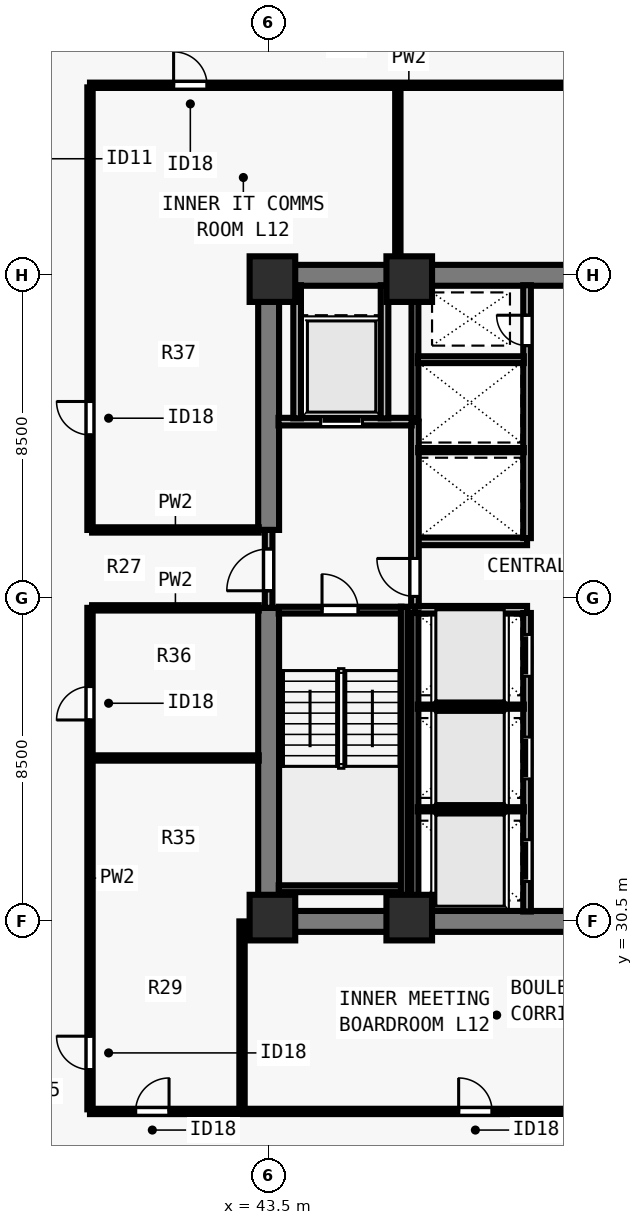
"""IFC4 building model, lengths in metres.
Left out: names, types, materials, properties, quantities, classifications, styles, units other than length and angle.
Written with IfcOpenShell. Run it as: python <this file> out.ifc"""

import sys

from ifc_helpers import new_model, si_unit, direction, frame, frame_2d, origin, origin_2d, place, context, subcontext, project, spatial, rectangle, extrude, element, fill, save


model = new_model("IFC4")
c1 = context("Model", 3, precision=1e-05, world=origin(), true_north=direction((0.0, 1.0)))
c2 = subcontext(c1, "Body", "Model", "MODEL_VIEW")
j1 = project(units=[si_unit("LENGTHUNIT", "METRE"), si_unit("PLANEANGLEUNIT", "RADIAN")], contexts=[c1])
p1 = place(None, origin())
s1 = spatial("IfcSite", under=j1, at=p1, CompositionType="ELEMENT")
p2 = place(p1, origin())
s2 = spatial("IfcBuilding", under=s1, at=p2, CompositionType="ELEMENT")
p3 = place(p2, frame((0.0, 0.0, 48.0)))
s3 = spatial("IfcBuildingStorey", under=s2, at=p3, CompositionType="ELEMENT", Elevation=48.0)
for number, where, z_axis, x_axis in (
    (1, (43.6, 30.6, 0.0), (0.0, 0.0, 1.0), (1.0, 0.0, 0.0)),
    (2, (47.2, 30.6, 0.0), (0.0, 0.0, 1.0), (1.0, 0.0, 0.0)),
    (3, (43.6, 47.4, 0.0), (0.0, 0.0, 1.0), (1.0, 0.0, 0.0)),
    (4, (47.2, 47.4, 0.0), (0.0, 0.0, 1.0), (1.0, 0.0, 0.0)),
):
    element("IfcColumn", number, at=place(p3, frame(where, z_axis=z_axis, x_axis=x_axis)), inside=s3, PredefinedType="COLUMN", context=c2, shape_type="SweptSolid", body=[
        extrude(rectangle(XDim=1.2, YDim=1.2, at=origin_2d()), origin(), (0.0, 0.0, 1.0), 3.5),
    ])
for number, where, z_axis, x_axis in (
    (5, (43.225, 30.5, 0.0), (0.0, 0.0, 1.0), (1.0, 0.0, 0.0)),
    (6, (43.225, 47.5, 0.0), (0.0, 0.0, 1.0), (1.0, 0.0, 0.0)),
):
    element("IfcWall", number, at=place(p3, frame(where, z_axis=z_axis, x_axis=x_axis)), inside=s3, PredefinedType="SHEAR", context=c2, shape_type="SweptSolid", body=[
        extrude(rectangle(XDim=17.55, YDim=0.55, at=frame_2d((8.775, 0.0))), origin(), (0.0, 0.0, 1.0), 3.28),
    ])
p4 = place(p3, frame((43.5, 30.765, 0.0), z_axis=(0.0, 0.0, 1.0), x_axis=(0.0, 1.0, 0.0)))
e7 = element("IfcWall", 7, at=p4, inside=s3, PredefinedType="SHEAR", context=c2, shape_type="SweptSolid", body=[
    extrude(rectangle(XDim=7.985, YDim=0.55, at=frame_2d((3.993, 0.0))), origin(), (0.0, 0.0, 1.0), 3.28),
])
p5 = place(p3, frame((43.5, 40.8, 0.0), z_axis=(0.0, 0.0, 1.0), x_axis=(0.0, 1.0, 0.0)))
e8 = element("IfcWall", 8, at=p5, inside=s3, PredefinedType="SHEAR", context=c2, shape_type="SweptSolid", body=[
    extrude(rectangle(XDim=6.435, YDim=0.55, at=frame_2d((3.218, 0.0))), origin(), (0.0, 0.0, 1.0), 3.28),
])
for number, where, z_axis, x_axis in (
    (9, (47.35, 38.7, 0.0), (0.0, 0.0, 1.0), (1.0, 0.0, 0.0)),
    (10, (47.35, 40.5, 0.0), (0.0, 0.0, 1.0), (1.0, 0.0, 0.0)),
):
    element("IfcWall", number, at=place(p3, frame(where, z_axis=z_axis, x_axis=x_axis)), inside=s3, PredefinedType="SOLIDWALL", context=c2, shape_type="SweptSolid", body=[
        extrude(rectangle(XDim=2.95, YDim=0.2, at=frame_2d((1.475, 0.0))), origin(), (0.0, 0.0, 1.0), 3.28),
    ])
p6 = place(p3, frame((50.3, 30.76, 0.0), z_axis=(0.0, 0.0, 1.0), x_axis=(0.0, 1.0, 0.0)))
e11 = element("IfcWall", 11, at=p6, inside=s3, PredefinedType="SOLIDWALL", context=c2, shape_type="SweptSolid", body=[
    extrude(rectangle(XDim=7.855, YDim=0.2, at=frame_2d((3.927, 0.0))), origin(), (0.0, 0.0, 1.0), 3.28),
])
p7 = place(p6, frame((0.79, 0.0, 0.0)))
e12 = element("IfcOpeningElement", 12, at=p7, cuts=e11, PredefinedType="OPENING", context=c2, shape_type="SweptSolid", body=[
    extrude(rectangle(XDim=1.1, YDim=2.2, at=frame_2d((0.55, 1.1))), frame((0.0, 0.11, 0.0), z_axis=(0.0, -1.0, 0.0), x_axis=(1.0, 0.0, 0.0)), (0.0, 0.0, 1.0), 0.22),
])
p8 = place(p6, frame((3.49, 0.0, 0.0)))
e13 = element("IfcOpeningElement", 13, at=p8, cuts=e11, PredefinedType="OPENING", context=c2, shape_type="SweptSolid", body=[
    extrude(rectangle(XDim=1.1, YDim=2.2, at=frame_2d((0.55, 1.1))), frame((0.0, 0.11, 0.0), z_axis=(0.0, -1.0, 0.0), x_axis=(1.0, 0.0, 0.0)), (0.0, 0.0, 1.0), 0.22),
])
p9 = place(p6, frame((6.19, 0.0, 0.0)))
e14 = element("IfcOpeningElement", 14, at=p9, cuts=e11, PredefinedType="OPENING", context=c2, shape_type="SweptSolid", body=[
    extrude(rectangle(XDim=1.1, YDim=2.2, at=frame_2d((0.55, 1.1))), frame((0.0, 0.11, 0.0), z_axis=(0.0, -1.0, 0.0), x_axis=(1.0, 0.0, 0.0)), (0.0, 0.0, 1.0), 0.22),
])
p10 = place(p3, frame((50.3, 40.585, 0.0), z_axis=(0.0, 0.0, 1.0), x_axis=(0.0, 1.0, 0.0)))
e15 = element("IfcWall", 15, at=p10, inside=s3, PredefinedType="SOLIDWALL", context=c2, shape_type="SweptSolid", body=[
    extrude(rectangle(XDim=6.655, YDim=0.2, at=frame_2d((3.328, 0.0))), origin(), (0.0, 0.0, 1.0), 3.28),
])
p11 = place(p10, frame((5.065, 0.0, 0.0)))
e16 = element("IfcOpeningElement", 16, at=p11, cuts=e15, PredefinedType="OPENING", context=c2, shape_type="SweptSolid", body=[
    extrude(rectangle(XDim=0.8, YDim=2.08, at=frame_2d((0.4, 1.04))), frame((0.0, 0.11, 0.0), z_axis=(0.0, -1.0, 0.0), x_axis=(1.0, 0.0, 0.0)), (0.0, 0.0, 1.0), 0.22),
])
p12 = place(p3, frame((43.5, 38.75, 0.0), z_axis=(0.0, 0.0, 1.0), x_axis=(0.0, 1.0, 0.0)))
e17 = element("IfcWall", 17, at=p12, inside=s3, PredefinedType="SOLIDWALL", context=c2, shape_type="SweptSolid", body=[
    extrude(rectangle(XDim=2.05, YDim=0.2, at=frame_2d((1.025, 0.0))), origin(), (0.0, 0.0, 1.0), 3.28),
])
p13 = place(p12, frame((0.45, 0.0, 0.0)))
e18 = element("IfcOpeningElement", 18, at=p13, cuts=e17, PredefinedType="OPENING", context=c2, shape_type="SweptSolid", body=[
    extrude(rectangle(XDim=1.1, YDim=2.15, at=frame_2d((0.55, 1.075))), frame((0.0, 0.11, 0.0), z_axis=(0.0, -1.0, 0.0), x_axis=(1.0, 0.0, 0.0)), (0.0, 0.0, 1.0), 0.22),
])
p14 = place(p3, frame((47.35, 38.785, 0.0), z_axis=(0.0, 0.0, 1.0), x_axis=(0.0, 1.0, 0.0)))
e19 = element("IfcWall", 19, at=p14, inside=s3, PredefinedType="SOLIDWALL", context=c2, shape_type="SweptSolid", body=[
    extrude(rectangle(XDim=4.865, YDim=0.2, at=frame_2d((2.433, 0.0))), origin(), (0.0, 0.0, 1.0), 3.28),
])
p15 = place(p14, frame((0.265, 0.0, 0.0)))
e20 = element("IfcOpeningElement", 20, at=p15, cuts=e19, PredefinedType="OPENING", context=c2, shape_type="SweptSolid", body=[
    extrude(rectangle(XDim=1.0, YDim=2.15, at=frame_2d((0.5, 1.075))), frame((0.0, 0.11, 0.0), z_axis=(0.0, -1.0, 0.0), x_axis=(1.0, 0.0, 0.0)), (0.0, 0.0, 1.0), 0.22),
])
p16 = place(p3, frame((43.76, 43.65, 0.0), z_axis=(0.0, 0.0, 1.0), x_axis=(1.0, 0.0, 0.0)))
e21 = element("IfcWall", 21, at=p16, inside=s3, PredefinedType="SOLIDWALL", context=c2, shape_type="SweptSolid", body=[
    extrude(rectangle(XDim=3.505, YDim=0.2, at=frame_2d((1.752, 0.0))), origin(), (0.0, 0.0, 1.0), 3.28),
])
p17 = place(p16, frame((1.11, 0.0, 0.0)))
e22 = element("IfcOpeningElement", 22, at=p17, cuts=e21, PredefinedType="OPENING", context=c2, shape_type="SweptSolid", body=[
    extrude(rectangle(XDim=1.1, YDim=2.2, at=frame_2d((0.55, 1.1))), frame((0.0, 0.11, 0.0), z_axis=(0.0, -1.0, 0.0), x_axis=(1.0, 0.0, 0.0)), (0.0, 0.0, 1.0), 0.22),
])
for number, where, z_axis, x_axis in (
    (23, (46.55, 43.735, 0.0), (0.0, 0.0, 1.0), (0.0, 1.0, 0.0)),
    (24, (44.25, 43.735, 0.0), (0.0, 0.0, 1.0), (0.0, 1.0, 0.0)),
):
    element("IfcWall", number, at=place(p3, frame(where, z_axis=z_axis, x_axis=x_axis)), inside=s3, PredefinedType="SOLIDWALL", context=c2, shape_type="SweptSolid", body=[
        extrude(rectangle(XDim=3.505, YDim=0.2, at=frame_2d((1.752, 0.0))), origin(), (0.0, 0.0, 1.0), 3.28),
    ])
p18 = place(p3, frame((47.35, 30.76, 0.0), z_axis=(0.0, 0.0, 1.0), x_axis=(0.0, 1.0, 0.0)))
e25 = element("IfcWall", 25, at=p18, inside=s3, PredefinedType="SOLIDWALL", context=c2, shape_type="SweptSolid", body=[
    extrude(rectangle(XDim=7.855, YDim=0.18, at=frame_2d((3.927, 0.0))), origin(), (0.0, 0.0, 1.0), 3.28),
])
for number, where, z_axis, x_axis in (
    (26, (47.425, 33.45, 0.0), (0.0, 0.0, 1.0), (1.0, 0.0, 0.0)),
    (27, (47.425, 36.15, 0.0), (0.0, 0.0, 1.0), (1.0, 0.0, 0.0)),
):
    element("IfcWall", number, at=place(p3, frame(where, z_axis=z_axis, x_axis=x_axis)), inside=s3, PredefinedType="PARTITIONING", context=c2, shape_type="SweptSolid", body=[
        extrude(rectangle(XDim=2.79, YDim=0.11, at=frame_2d((1.395, 0.0))), origin(), (0.0, 0.0, 1.0), 3.28),
    ])
p19 = place(p3, frame((47.35, 43.735, 0.0), z_axis=(0.0, 0.0, 1.0), x_axis=(0.0, 1.0, 0.0)))
e28 = element("IfcWall", 28, at=p19, inside=s3, PredefinedType="SOLIDWALL", context=c2, shape_type="SweptSolid", body=[
    extrude(rectangle(XDim=3.505, YDim=0.18, at=frame_2d((1.752, 0.0))), origin(), (0.0, 0.0, 1.0), 3.28),
])
p20 = place(p3, frame((47.435, 42.9, 0.0), z_axis=(0.0, 0.0, 1.0), x_axis=(1.0, 0.0, 0.0)))
e29 = element("IfcWall", 29, at=p20, inside=s3, PredefinedType="PARTITIONING", context=c2, shape_type="SweptSolid", body=[
    extrude(rectangle(XDim=2.78, YDim=0.11, at=frame_2d((1.39, 0.0))), origin(), (0.0, 0.0, 1.0), 3.28),
])
p21 = place(p3, frame((47.425, 45.28, 0.0), z_axis=(0.0, 0.0, 1.0), x_axis=(1.0, 0.0, 0.0)))
e30 = element("IfcWall", 30, at=p21, inside=s3, PredefinedType="SOLIDWALL", context=c2, shape_type="SweptSolid", body=[
    extrude(rectangle(XDim=2.79, YDim=0.18, at=frame_2d((1.395, 0.0))), origin(), (0.0, 0.0, 1.0), 3.28),
])
p22 = place(p3, frame((38.8, 25.5, 0.0), z_axis=(0.0, 0.0, 1.0), x_axis=(1.0, 0.0, 0.0)))
e31 = element("IfcWall", 31, at=p22, inside=s3, PredefinedType="PARTITIONING", context=c2, shape_type="SweptSolid", body=[
    extrude(rectangle(XDim=26.4, YDim=0.14, at=frame_2d((13.2, 0.0))), origin(), (0.0, 0.0, 1.0), 3.28),
])
p23 = place(p22, frame((1.2, 0.0, 0.0)))
e32 = element("IfcOpeningElement", 32, at=p23, cuts=e31, PredefinedType="OPENING", context=c2, shape_type="SweptSolid", body=[
    extrude(rectangle(XDim=0.88, YDim=2.1, at=frame_2d((0.44, 1.05))), frame((0.0, 0.08, 0.0), z_axis=(0.0, -1.0, 0.0), x_axis=(1.0, 0.0, 0.0)), (0.0, 0.0, 1.0), 0.16),
])
p24 = place(p22, frame((9.7, 0.0, 0.0)))
e33 = element("IfcOpeningElement", 33, at=p24, cuts=e31, PredefinedType="OPENING", context=c2, shape_type="SweptSolid", body=[
    extrude(rectangle(XDim=0.88, YDim=2.1, at=frame_2d((0.44, 1.05))), frame((0.0, 0.08, 0.0), z_axis=(0.0, -1.0, 0.0), x_axis=(1.0, 0.0, 0.0)), (0.0, 0.0, 1.0), 0.16),
])
p25 = place(p22, frame((20.2, 0.0, 0.0)))
e34 = element("IfcOpeningElement", 34, at=p25, cuts=e31, PredefinedType="OPENING", context=c2, shape_type="SweptSolid", body=[
    extrude(rectangle(XDim=0.88, YDim=2.1, at=frame_2d((0.44, 1.05))), frame((0.0, 0.08, 0.0), z_axis=(0.0, -1.0, 0.0), x_axis=(1.0, 0.0, 0.0)), (0.0, 0.0, 1.0), 0.16),
])
p26 = place(p3, frame((38.8, 52.5, 0.0), z_axis=(0.0, 0.0, 1.0), x_axis=(1.0, 0.0, 0.0)))
e35 = element("IfcWall", 35, at=p26, inside=s3, PredefinedType="PARTITIONING", context=c2, shape_type="SweptSolid", body=[
    extrude(rectangle(XDim=26.4, YDim=0.14, at=frame_2d((13.2, 0.0))), origin(), (0.0, 0.0, 1.0), 3.28),
])
p27 = place(p26, frame((2.2, 0.0, 0.0)))
e36 = element("IfcOpeningElement", 36, at=p27, cuts=e35, PredefinedType="OPENING", context=c2, shape_type="SweptSolid", body=[
    extrude(rectangle(XDim=0.88, YDim=2.1, at=frame_2d((0.44, 1.05))), frame((0.0, 0.08, 0.0), z_axis=(0.0, -1.0, 0.0), x_axis=(1.0, 0.0, 0.0)), (0.0, 0.0, 1.0), 0.16),
])
p28 = place(p26, frame((13.7, 0.0, 0.0)))
e37 = element("IfcOpeningElement", 37, at=p28, cuts=e35, PredefinedType="OPENING", context=c2, shape_type="SweptSolid", body=[
    extrude(rectangle(XDim=0.88, YDim=2.1, at=frame_2d((0.44, 1.05))), frame((0.0, 0.08, 0.0), z_axis=(0.0, -1.0, 0.0), x_axis=(1.0, 0.0, 0.0)), (0.0, 0.0, 1.0), 0.16),
])
p29 = place(p26, frame((23.2, 0.0, 0.0)))
e38 = element("IfcOpeningElement", 38, at=p29, cuts=e35, PredefinedType="OPENING", context=c2, shape_type="SweptSolid", body=[
    extrude(rectangle(XDim=0.88, YDim=2.1, at=frame_2d((0.44, 1.05))), frame((0.0, 0.08, 0.0), z_axis=(0.0, -1.0, 0.0), x_axis=(1.0, 0.0, 0.0)), (0.0, 0.0, 1.0), 0.16),
])
p30 = place(p3, frame((38.8, 25.555, 0.0), z_axis=(0.0, 0.0, 1.0), x_axis=(0.0, 1.0, 0.0)))
e39 = element("IfcWall", 39, at=p30, inside=s3, PredefinedType="PARTITIONING", context=c2, shape_type="SweptSolid", body=[
    extrude(rectangle(XDim=13.195, YDim=0.14, at=frame_2d((6.598, 0.0))), origin(), (0.0, 0.0, 1.0), 3.28),
])
p31 = place(p30, frame((1.045, 0.0, 0.0)))
e40 = element("IfcOpeningElement", 40, at=p31, cuts=e39, PredefinedType="OPENING", context=c2, shape_type="SweptSolid", body=[
    extrude(rectangle(XDim=0.88, YDim=2.1, at=frame_2d((0.44, 1.05))), frame((0.0, 0.08, 0.0), z_axis=(0.0, -1.0, 0.0), x_axis=(1.0, 0.0, 0.0)), (0.0, 0.0, 1.0), 0.16),
])
p32 = place(p30, frame((10.245, 0.0, 0.0)))
e41 = element("IfcOpeningElement", 41, at=p32, cuts=e39, PredefinedType="OPENING", context=c2, shape_type="SweptSolid", body=[
    extrude(rectangle(XDim=0.88, YDim=2.1, at=frame_2d((0.44, 1.05))), frame((0.0, 0.08, 0.0), z_axis=(0.0, -1.0, 0.0), x_axis=(1.0, 0.0, 0.0)), (0.0, 0.0, 1.0), 0.16),
])
p33 = place(p3, frame((38.8, 40.8, 0.0), z_axis=(0.0, 0.0, 1.0), x_axis=(0.0, 1.0, 0.0)))
e42 = element("IfcWall", 42, at=p33, inside=s3, PredefinedType="PARTITIONING", context=c2, shape_type="SweptSolid", body=[
    extrude(rectangle(XDim=11.645, YDim=0.14, at=frame_2d((5.823, 0.0))), origin(), (0.0, 0.0, 1.0), 3.28),
])
p34 = place(p33, frame((2.5, 0.0, 0.0)))
e43 = element("IfcOpeningElement", 43, at=p34, cuts=e42, PredefinedType="OPENING", context=c2, shape_type="SweptSolid", body=[
    extrude(rectangle(XDim=0.88, YDim=2.1, at=frame_2d((0.44, 1.05))), frame((0.0, 0.08, 0.0), z_axis=(0.0, -1.0, 0.0), x_axis=(1.0, 0.0, 0.0)), (0.0, 0.0, 1.0), 0.16),
])
for number, where, z_axis, x_axis in (
    (44, (38.855, 38.75, 0.0), (0.0, 0.0, 1.0), (1.0, 0.0, 0.0)),
    (45, (38.855, 40.8, 0.0), (0.0, 0.0, 1.0), (1.0, 0.0, 0.0)),
):
    element("IfcWall", number, at=place(p3, frame(where, z_axis=z_axis, x_axis=x_axis)), inside=s3, PredefinedType="PARTITIONING", context=c2, shape_type="SweptSolid", body=[
        extrude(rectangle(XDim=4.385, YDim=0.14, at=frame_2d((2.192, 0.0))), origin(), (0.0, 0.0, 1.0), 3.28),
    ])
p35 = place(p3, frame((42.8, 25.555, 0.0), z_axis=(0.0, 0.0, 1.0), x_axis=(0.0, 1.0, 0.0)))
e46 = element("IfcWall", 46, at=p35, inside=s3, PredefinedType="PARTITIONING", context=c2, shape_type="SweptSolid", body=[
    extrude(rectangle(XDim=4.945, YDim=0.14, at=frame_2d((2.473, 0.0))), origin(), (0.0, 0.0, 1.0), 2.439),
])
p36 = place(p3, frame((46.9, 47.76, 0.0), z_axis=(0.0, 0.0, 1.0), x_axis=(0.0, 1.0, 0.0)))
e47 = element("IfcWall", 47, at=p36, inside=s3, PredefinedType="PARTITIONING", context=c2, shape_type="SweptSolid", body=[
    extrude(rectangle(XDim=4.685, YDim=0.14, at=frame_2d((2.343, 0.0))), origin(), (0.0, 0.0, 1.0), 3.28),
])
p37 = place(p3, frame((38.855, 34.8, 0.0), z_axis=(0.0, 0.0, 1.0), x_axis=(1.0, 0.0, 0.0)))
e48 = element("IfcWall", 48, at=p37, inside=s3, PredefinedType="PARTITIONING", context=c2, shape_type="SweptSolid", body=[
    extrude(rectangle(XDim=4.385, YDim=0.14, at=frame_2d((2.192, 0.0))), origin(), (0.0, 0.0, 1.0), 3.28),
])
p38 = place(p3, frame((43.765, 38.69, 0.0), z_axis=(0.0, 0.0, 1.0), x_axis=(1.0, 0.0, 0.0)))
e49 = element("IfcWall", 49, at=p38, inside=s3, PredefinedType="SOLIDWALL", context=c2, shape_type="SweptSolid", body=[
    extrude(rectangle(XDim=3.23, YDim=0.18, at=frame_2d((1.615, 0.0))), origin(), (0.0, 0.0, 1.0), 3.28),
])
p39 = place(p38, frame((1.14, 0.0, 0.0)))
e50 = element("IfcOpeningElement", 50, at=p39, cuts=e49, PredefinedType="OPENING", context=c2, shape_type="SweptSolid", body=[
    extrude(rectangle(XDim=0.95, YDim=2.15, at=frame_2d((0.475, 1.075))), frame((0.0, 0.1, 0.0), z_axis=(0.0, -1.0, 0.0), x_axis=(1.0, 0.0, 0.0)), (0.0, 0.0, 1.0), 0.2),
])
p40 = place(p3, frame((43.765, 31.36, 0.0), z_axis=(0.0, 0.0, 1.0), x_axis=(1.0, 0.0, 0.0)))
e51 = element("IfcWall", 51, at=p40, inside=s3, PredefinedType="SOLIDWALL", context=c2, shape_type="SweptSolid", body=[
    extrude(rectangle(XDim=3.23, YDim=0.18, at=frame_2d((1.615, 0.0))), origin(), (0.0, 0.0, 1.0), 3.28),
])
p41 = place(p3, frame((47.07, 38.78, 0.0), z_axis=(0.0, 0.0, 1.0), x_axis=(0.0, -1.0, 0.0)))
e52 = element("IfcWall", 52, at=p41, inside=s3, PredefinedType="SOLIDWALL", context=c2, shape_type="SweptSolid", body=[
    extrude(rectangle(XDim=8.017, YDim=0.18, at=frame_2d((4.009, 0.0))), origin(), (0.0, 0.0, 1.0), 3.28),
])
p42 = place(p13, origin())
e53 = element("IfcDoor", 53, at=p42, inside=s3, OperationType="SINGLE_SWING_LEFT", PredefinedType="DOOR", context=c2, shape_type="SweptSolid", body=[
    extrude(rectangle(XDim=1.1, YDim=2.15, at=frame_2d((0.55, 1.075))), frame((0.0, 0.025, 0.0), z_axis=(0.0, -1.0, 0.0), x_axis=(1.0, 0.0, 0.0)), (0.0, 0.0, 1.0), 0.05),
])
fill(e18, e53)
p43 = place(p15, origin())
e54 = element("IfcDoor", 54, at=p43, inside=s3, OperationType="SINGLE_SWING_RIGHT", PredefinedType="DOOR", context=c2, shape_type="SweptSolid", body=[
    extrude(rectangle(XDim=1.0, YDim=2.15, at=frame_2d((0.5, 1.075))), frame((0.0, 0.025, 0.0), z_axis=(0.0, -1.0, 0.0), x_axis=(1.0, 0.0, 0.0)), (0.0, 0.0, 1.0), 0.05),
])
fill(e20, e54)
p44 = place(p17, origin())
e55 = element("IfcDoor", 55, at=p44, inside=s3, OperationType="SLIDING_TO_LEFT", PredefinedType="DOOR", context=c2, shape_type="SweptSolid", body=[
    extrude(rectangle(XDim=1.1, YDim=2.2, at=frame_2d((0.55, 1.1))), frame((0.0, 0.025, 0.0), z_axis=(0.0, -1.0, 0.0), x_axis=(1.0, 0.0, 0.0)), (0.0, 0.0, 1.0), 0.05),
])
fill(e22, e55)
p45 = place(p7, origin())
e56 = element("IfcDoor", 56, at=p45, inside=s3, OperationType="SLIDING_TO_LEFT", PredefinedType="DOOR", context=c2, shape_type="SweptSolid", body=[
    extrude(rectangle(XDim=1.1, YDim=2.2, at=frame_2d((0.55, 1.1))), frame((0.0, 0.025, 0.0), z_axis=(0.0, -1.0, 0.0), x_axis=(1.0, 0.0, 0.0)), (0.0, 0.0, 1.0), 0.05),
])
fill(e12, e56)
p46 = place(p8, origin())
e57 = element("IfcDoor", 57, at=p46, inside=s3, OperationType="SLIDING_TO_LEFT", PredefinedType="DOOR", context=c2, shape_type="SweptSolid", body=[
    extrude(rectangle(XDim=1.1, YDim=2.2, at=frame_2d((0.55, 1.1))), frame((0.0, 0.025, 0.0), z_axis=(0.0, -1.0, 0.0), x_axis=(1.0, 0.0, 0.0)), (0.0, 0.0, 1.0), 0.05),
])
fill(e13, e57)
p47 = place(p9, origin())
e58 = element("IfcDoor", 58, at=p47, inside=s3, OperationType="SLIDING_TO_LEFT", PredefinedType="DOOR", context=c2, shape_type="SweptSolid", body=[
    extrude(rectangle(XDim=1.1, YDim=2.2, at=frame_2d((0.55, 1.1))), frame((0.0, 0.025, 0.0), z_axis=(0.0, -1.0, 0.0), x_axis=(1.0, 0.0, 0.0)), (0.0, 0.0, 1.0), 0.05),
])
fill(e14, e58)
p48 = place(p11, origin())
e59 = element("IfcDoor", 59, at=p48, inside=s3, OperationType="SINGLE_SWING_RIGHT", PredefinedType="DOOR", context=c2, shape_type="SweptSolid", body=[
    extrude(rectangle(XDim=0.8, YDim=2.08, at=frame_2d((0.4, 1.04))), frame((0.0, 0.025, 0.0), z_axis=(0.0, -1.0, 0.0), x_axis=(1.0, 0.0, 0.0)), (0.0, 0.0, 1.0), 0.05),
])
fill(e16, e59)
p49 = place(p23, origin())
e60 = element("IfcDoor", 60, at=p49, inside=s3, OperationType="SINGLE_SWING_RIGHT", PredefinedType="DOOR", context=c2, shape_type="SweptSolid", body=[
    extrude(rectangle(XDim=0.88, YDim=2.1, at=frame_2d((0.44, 1.05))), frame((0.0, 0.025, 0.0), z_axis=(0.0, -1.0, 0.0), x_axis=(1.0, 0.0, 0.0)), (0.0, 0.0, 1.0), 0.05),
])
fill(e32, e60)
p50 = place(p24, origin())
e61 = element("IfcDoor", 61, at=p50, inside=s3, OperationType="SINGLE_SWING_LEFT", PredefinedType="DOOR", context=c2, shape_type="SweptSolid", body=[
    extrude(rectangle(XDim=0.88, YDim=2.1, at=frame_2d((0.44, 1.05))), frame((0.0, 0.025, 0.0), z_axis=(0.0, -1.0, 0.0), x_axis=(1.0, 0.0, 0.0)), (0.0, 0.0, 1.0), 0.05),
])
fill(e33, e61)
p51 = place(p27, origin())
e62 = element("IfcDoor", 62, at=p51, inside=s3, OperationType="SINGLE_SWING_LEFT", PredefinedType="DOOR", context=c2, shape_type="SweptSolid", body=[
    extrude(rectangle(XDim=0.88, YDim=2.1, at=frame_2d((0.44, 1.05))), frame((0.0, 0.025, 0.0), z_axis=(0.0, -1.0, 0.0), x_axis=(1.0, 0.0, 0.0)), (0.0, 0.0, 1.0), 0.05),
])
fill(e36, e62)
p52 = place(p31, origin())
e63 = element("IfcDoor", 63, at=p52, inside=s3, OperationType="SINGLE_SWING_RIGHT", PredefinedType="DOOR", context=c2, shape_type="SweptSolid", body=[
    extrude(rectangle(XDim=0.88, YDim=2.1, at=frame_2d((0.44, 1.05))), frame((0.0, 0.025, 0.0), z_axis=(0.0, -1.0, 0.0), x_axis=(1.0, 0.0, 0.0)), (0.0, 0.0, 1.0), 0.05),
])
fill(e40, e63)
p53 = place(p32, origin())
e64 = element("IfcDoor", 64, at=p53, inside=s3, OperationType="SINGLE_SWING_LEFT", PredefinedType="DOOR", context=c2, shape_type="SweptSolid", body=[
    extrude(rectangle(XDim=0.88, YDim=2.1, at=frame_2d((0.44, 1.05))), frame((0.0, 0.025, 0.0), z_axis=(0.0, -1.0, 0.0), x_axis=(1.0, 0.0, 0.0)), (0.0, 0.0, 1.0), 0.05),
])
fill(e41, e64)
p54 = place(p34, origin())
e65 = element("IfcDoor", 65, at=p54, inside=s3, OperationType="SINGLE_SWING_RIGHT", PredefinedType="DOOR", context=c2, shape_type="SweptSolid", body=[
    extrude(rectangle(XDim=0.88, YDim=2.1, at=frame_2d((0.44, 1.05))), frame((0.0, 0.025, 0.0), z_axis=(0.0, -1.0, 0.0), x_axis=(1.0, 0.0, 0.0)), (0.0, 0.0, 1.0), 0.05),
])
fill(e43, e65)
p55 = place(p39, origin())
e66 = element("IfcDoor", 66, at=p55, inside=s3, OperationType="SINGLE_SWING_LEFT", PredefinedType="DOOR", context=c2, shape_type="SweptSolid", body=[
    extrude(rectangle(XDim=0.95, YDim=2.15, at=frame_2d((0.475, 1.075))), frame((0.0, 0.025, 0.0), z_axis=(0.0, -1.0, 0.0), x_axis=(1.0, 0.0, 0.0)), (0.0, 0.0, 1.0), 0.05),
])
fill(e50, e66)
save(model, sys.argv[1])
